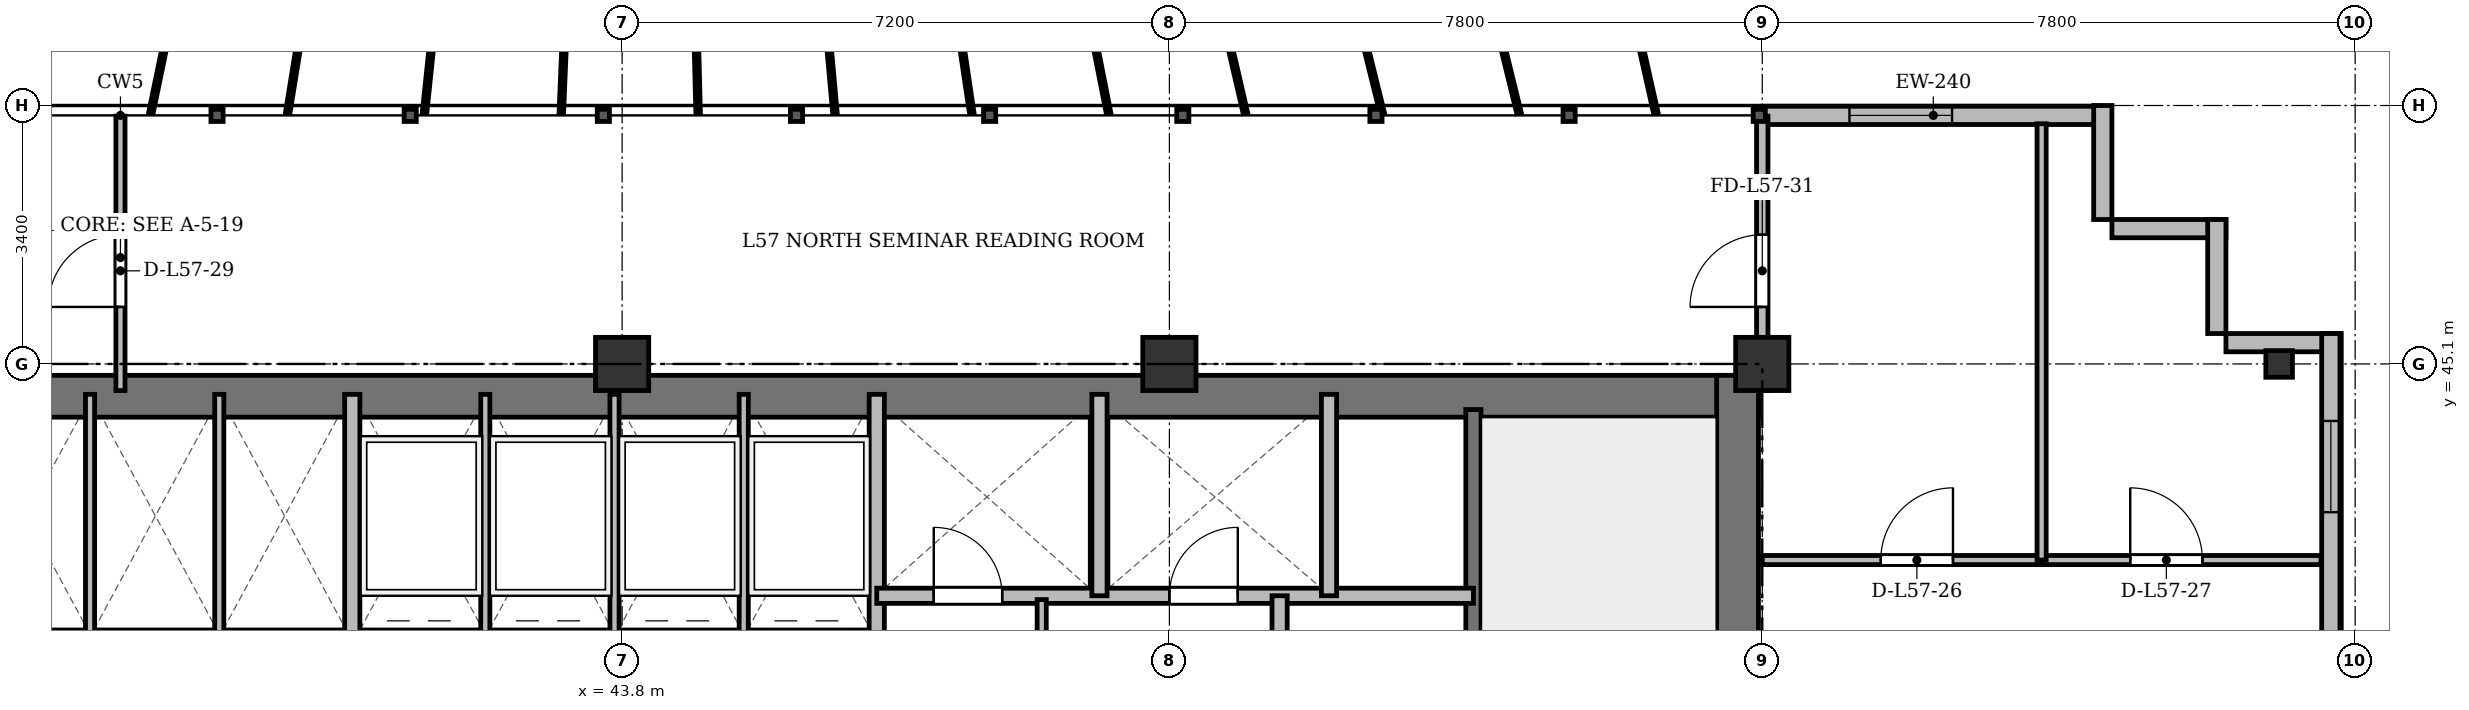
"""IFC4 building model, lengths in metres.
Left out: names, types, materials, properties, quantities, classifications, styles, units other than length and angle.
Written with IfcOpenShell. Run it as: python <this file> out.ifc"""

import sys

from ifc_helpers import new_model, si_unit, direction, frame, frame_2d, origin, origin_2d, place, context, subcontext, project, spatial, rectangle, i_section, extrude, source, transform, mapped, element, fill, save


model = new_model("IFC4")
c1 = context("Model", 3, precision=1e-05, world=origin(), true_north=direction((0.0, 1.0)))
c2 = subcontext(c1, "Body", "Model", "MODEL_VIEW")
j1 = project(units=[si_unit("LENGTHUNIT", "METRE"), si_unit("PLANEANGLEUNIT", "RADIAN")], contexts=[c1])
p1 = place(None, origin())
s1 = spatial("IfcSite", under=j1, at=p1, CompositionType="ELEMENT")
p2 = place(p1, origin())
s2 = spatial("IfcBuilding", under=s1, at=p2, CompositionType="ELEMENT")
p3 = place(p2, frame((0.0, 0.0, 219.3)))
s3 = spatial("IfcBuildingStorey", under=s2, at=p3, CompositionType="ELEMENT", Elevation=219.3)
m1 = source(origin(), c2, "Body", "SweptSolid", [
    extrude(rectangle(XDim=0.7, YDim=0.7, at=origin_2d()), origin(), (0.0, 0.0, 1.0), 3.6),
])
for number, where, z_axis, x_axis in (
    (1, (43.8, 45.1, 0.0), (0.0, 0.0, 1.0), (1.0, 0.0, 0.0)),
    (2, (51.0, 45.1, 0.0), (0.0, 0.0, 1.0), (1.0, 0.0, 0.0)),
    (3, (58.8, 45.1, 0.0), (0.0, 0.0, 1.0), (1.0, 0.0, 0.0)),
):
    element("IfcColumn", number, at=place(p3, frame(where, z_axis=z_axis, x_axis=x_axis)), inside=s3, PredefinedType="COLUMN", context=c2, shape_type="MappedRepresentation", body=[
        mapped(m1, transform((0.0, 0.0, 0.0), x_axis=(1.0, 0.0, 0.0), y_axis=(0.0, 1.0, 0.0), z_axis=(0.0, 0.0, 1.0), scale=1.0)),
    ])
m2 = source(origin(), c2, "Body", "SweptSolid", [
    extrude(i_section(OverallWidth=0.35, OverallDepth=0.35, WebThickness=0.018, FlangeThickness=0.028, at=origin_2d()), origin(), (0.0, 0.0, 1.0), 3.6),
])
p4 = place(p3, frame((65.6, 45.1, 0.0), z_axis=(0.0, 0.0, 1.0), x_axis=(1.0, 0.0, 0.0)))
e4 = element("IfcColumn", 4, at=p4, inside=s3, PredefinedType="COLUMN", context=c2, shape_type="MappedRepresentation", body=[
    mapped(m2, transform((0.0, 0.0, 0.0), x_axis=(1.0, 0.0, 0.0), y_axis=(0.0, 1.0, 0.0), z_axis=(0.0, 0.0, 1.0), scale=1.0)),
])
p5 = place(p3, frame((58.8, 48.37, 0.0), z_axis=(0.0, 0.0, 1.0), x_axis=(1.0, 0.0, 0.0)))
e5 = element("IfcWall", 5, at=p5, inside=s3, PredefinedType="SOLIDWALL", context=c2, shape_type="SweptSolid", body=[
    extrude(rectangle(XDim=4.5, YDim=0.24, at=frame_2d((2.25, 0.0))), origin(), (0.0, 0.0, 1.0), 3.36),
])
p6 = place(p5, frame((1.147, 0.0, 0.9)))
e6 = element("IfcOpeningElement", 6, at=p6, cuts=e5, PredefinedType="OPENING", context=c2, shape_type="SweptSolid", body=[
    extrude(rectangle(XDim=1.35, YDim=1.5, at=frame_2d((0.675, 0.75))), frame((0.0, 0.13, 0.0), z_axis=(0.0, -1.0, 0.0), x_axis=(1.0, 0.0, 0.0)), (0.0, 0.0, 1.0), 0.26),
])
for number, where, z_axis, x_axis in (
    (7, (63.28, 48.5, 0.0), (0.0, 0.0, 1.0), (0.0, -1.0, 0.0)),
    (8, (63.4, 46.88, 0.0), (0.0, 0.0, 1.0), (1.0, 0.0, 0.0)),
    (9, (64.78, 47.0, 0.0), (0.0, 0.0, 1.0), (0.0, -1.0, 0.0)),
    (10, (64.9, 45.38, 0.0), (0.0, 0.0, 1.0), (1.0, 0.0, 0.0)),
):
    element("IfcWall", number, at=place(p3, frame(where, z_axis=z_axis, x_axis=x_axis)), inside=s3, PredefinedType="SOLIDWALL", context=c2, shape_type="SweptSolid", body=[
        extrude(rectangle(XDim=1.5, YDim=0.24, at=frame_2d((0.75, 0.0))), origin(), (0.0, 0.0, 1.0), 3.36),
    ])
p7 = place(p3, frame((66.28, 45.5, 0.0), z_axis=(0.0, 0.0, 1.0), x_axis=(0.0, -1.0, 0.0)))
e11 = element("IfcWall", 11, at=p7, inside=s3, PredefinedType="SOLIDWALL", context=c2, shape_type="SweptSolid", body=[
    extrude(rectangle(XDim=39.1, YDim=0.24, at=frame_2d((19.55, 0.0))), origin(), (0.0, 0.0, 1.0), 3.36),
])
p8 = place(p7, frame((36.45, 0.0, 0.92)))
e12 = element("IfcOpeningElement", 12, at=p8, cuts=e11, PredefinedType="OPENING", context=c2, shape_type="SweptSolid", body=[
    extrude(rectangle(XDim=1.2, YDim=1.65, at=frame_2d((0.6, 0.825))), frame((0.0, 0.13, 0.0), z_axis=(0.0, -1.0, 0.0), x_axis=(1.0, 0.0, 0.0)), (0.0, 0.0, 1.0), 0.26),
])
p9 = place(p7, frame((32.9, 0.0, 0.92)))
e13 = element("IfcOpeningElement", 13, at=p9, cuts=e11, PredefinedType="OPENING", context=c2, shape_type="SweptSolid", body=[
    extrude(rectangle(XDim=2.4, YDim=2.1, at=frame_2d((1.2, 1.05))), frame((0.0, 0.13, 0.0), z_axis=(0.0, -1.0, 0.0), x_axis=(1.0, 0.0, 0.0)), (0.0, 0.0, 1.0), 0.26),
])
p10 = place(p7, frame((28.7, 0.0, 0.92)))
e14 = element("IfcOpeningElement", 14, at=p10, cuts=e11, PredefinedType="OPENING", context=c2, shape_type="SweptSolid", body=[
    extrude(rectangle(XDim=2.4, YDim=2.1, at=frame_2d((1.2, 1.05))), frame((0.0, 0.13, 0.0), z_axis=(0.0, -1.0, 0.0), x_axis=(1.0, 0.0, 0.0)), (0.0, 0.0, 1.0), 0.26),
])
p11 = place(p7, frame((21.5, 0.0, 0.92)))
e15 = element("IfcOpeningElement", 15, at=p11, cuts=e11, PredefinedType="OPENING", context=c2, shape_type="SweptSolid", body=[
    extrude(rectangle(XDim=2.4, YDim=2.1, at=frame_2d((1.2, 1.05))), frame((0.0, 0.13, 0.0), z_axis=(0.0, -1.0, 0.0), x_axis=(1.0, 0.0, 0.0)), (0.0, 0.0, 1.0), 0.26),
])
p12 = place(p7, frame((7.5, 0.0, 0.92)))
e16 = element("IfcOpeningElement", 16, at=p12, cuts=e11, PredefinedType="OPENING", context=c2, shape_type="SweptSolid", body=[
    extrude(rectangle(XDim=2.4, YDim=2.1, at=frame_2d((1.2, 1.05))), frame((0.0, 0.13, 0.0), z_axis=(0.0, -1.0, 0.0), x_axis=(1.0, 0.0, 0.0)), (0.0, 0.0, 1.0), 0.26),
])
p13 = place(p7, frame((4.5, 0.0, 0.92)))
e17 = element("IfcOpeningElement", 17, at=p13, cuts=e11, PredefinedType="OPENING", context=c2, shape_type="SweptSolid", body=[
    extrude(rectangle(XDim=1.2, YDim=1.65, at=frame_2d((0.6, 0.825))), frame((0.0, 0.13, 0.0), z_axis=(0.0, -1.0, 0.0), x_axis=(1.0, 0.0, 0.0)), (0.0, 0.0, 1.0), 0.26),
])
p14 = place(p7, frame((1.15, 0.0, 0.92)))
e18 = element("IfcOpeningElement", 18, at=p14, cuts=e11, PredefinedType="OPENING", context=c2, shape_type="SweptSolid", body=[
    extrude(rectangle(XDim=1.2, YDim=1.65, at=frame_2d((0.6, 0.825))), frame((0.0, 0.13, 0.0), z_axis=(0.0, -1.0, 0.0), x_axis=(1.0, 0.0, 0.0)), (0.0, 0.0, 1.0), 0.26),
])
p15 = place(p3, frame((15.65, 44.675, 0.0), z_axis=(0.0, 0.0, 1.0), x_axis=(1.0, 0.0, 0.0)))
e19 = element("IfcWall", 19, at=p15, inside=s3, PredefinedType="SHEAR", context=c2, shape_type="SweptSolid", body=[
    extrude(rectangle(XDim=43.1, YDim=0.55, at=frame_2d((21.55, 0.0))), origin(), (0.0, 0.0, 1.0), 3.36),
])
p16 = place(p3, frame((58.475, 33.4, 0.0), z_axis=(0.0, 0.0, 1.0), x_axis=(0.0, 1.0, 0.0)))
e20 = element("IfcWall", 20, at=p16, inside=s3, PredefinedType="SHEAR", context=c2, shape_type="SweptSolid", body=[
    extrude(rectangle(XDim=11.55, YDim=0.55, at=frame_2d((5.775, 0.0))), origin(), (0.0, 0.0, 1.0), 3.36),
])
p17 = place(p3, frame((55.0, 33.4, 0.0), z_axis=(0.0, 0.0, 1.0), x_axis=(0.0, 1.0, 0.0)))
e21 = element("IfcWall", 21, at=p17, inside=s3, PredefinedType="SHEAR", context=c2, shape_type="SweptSolid", body=[
    extrude(rectangle(XDim=11.1, YDim=0.2, at=frame_2d((5.55, 0.0))), origin(), (0.0, 0.0, 1.0), 3.36),
])
p18 = place(p17, frame((0.85, 0.0, 0.0)))
e22 = element("IfcOpeningElement", 22, at=p18, cuts=e21, PredefinedType="OPENING", context=c2, shape_type="SweptSolid", body=[
    extrude(rectangle(XDim=1.1, YDim=2.15, at=frame_2d((0.55, 1.075))), frame((0.0, 0.11, 0.0), z_axis=(0.0, -1.0, 0.0), x_axis=(1.0, 0.0, 0.0)), (0.0, 0.0, 1.0), 0.22),
])
for number, where, z_axis, x_axis in (
    (23, (36.8, 41.5, 0.0), (0.0, 0.0, 1.0), (0.0, 1.0, 0.0)),
    (24, (38.5, 41.5, 0.0), (0.0, 0.0, 1.0), (0.0, 1.0, 0.0)),
):
    element("IfcWall", number, at=place(p3, frame(where, z_axis=z_axis, x_axis=x_axis)), inside=s3, PredefinedType="PARTITIONING", context=c2, shape_type="SweptSolid", body=[
        extrude(rectangle(XDim=3.2, YDim=0.12, at=frame_2d((1.6, 0.0))), origin(), (0.0, 0.0, 1.0), 3.36),
    ])
p19 = place(p3, frame((40.25, 41.5, 0.0), z_axis=(0.0, 0.0, 1.0), x_axis=(0.0, 1.0, 0.0)))
e25 = element("IfcWall", 25, at=p19, inside=s3, PredefinedType="SOLIDWALL", context=c2, shape_type="SweptSolid", body=[
    extrude(rectangle(XDim=3.2, YDim=0.2, at=frame_2d((1.6, 0.0))), origin(), (0.0, 0.0, 1.0), 3.36),
])
for number, where, z_axis, x_axis in (
    (26, (42.0, 41.5, 0.0), (0.0, 0.0, 1.0), (0.0, 1.0, 0.0)),
    (27, (43.7, 41.5, 0.0), (0.0, 0.0, 1.0), (0.0, 1.0, 0.0)),
    (28, (45.4, 41.5, 0.0), (0.0, 0.0, 1.0), (0.0, 1.0, 0.0)),
):
    element("IfcWall", number, at=place(p3, frame(where, z_axis=z_axis, x_axis=x_axis)), inside=s3, PredefinedType="PARTITIONING", context=c2, shape_type="SweptSolid", body=[
        extrude(rectangle(XDim=3.2, YDim=0.12, at=frame_2d((1.6, 0.0))), origin(), (0.0, 0.0, 1.0), 3.36),
    ])
p20 = place(p3, frame((47.15, 33.4, 0.0), z_axis=(0.0, 0.0, 1.0), x_axis=(0.0, 1.0, 0.0)))
e29 = element("IfcWall", 29, at=p20, inside=s3, PredefinedType="SOLIDWALL", context=c2, shape_type="SweptSolid", body=[
    extrude(rectangle(XDim=11.3, YDim=0.2, at=frame_2d((5.65, 0.0))), origin(), (0.0, 0.0, 1.0), 2.91),
])
p21 = place(p3, frame((47.15, 42.05, 0.0), z_axis=(0.0, 0.0, 1.0), x_axis=(1.0, 0.0, 0.0)))
e30 = element("IfcWall", 30, at=p21, inside=s3, PredefinedType="SOLIDWALL", context=c2, shape_type="SweptSolid", body=[
    extrude(rectangle(XDim=7.85, YDim=0.2, at=frame_2d((3.925, 0.0))), origin(), (0.0, 0.0, 1.0), 2.86),
])
p22 = place(p21, frame((0.75, 0.0, 0.0)))
e31 = element("IfcOpeningElement", 31, at=p22, cuts=e30, PredefinedType="OPENING", context=c2, shape_type="SweptSolid", body=[
    extrude(rectangle(XDim=0.9, YDim=2.1, at=frame_2d((0.45, 1.05))), frame((0.0, 0.11, 0.0), z_axis=(0.0, -1.0, 0.0), x_axis=(1.0, 0.0, 0.0)), (0.0, 0.0, 1.0), 0.22),
])
p23 = place(p21, frame((3.85, 0.0, 0.0)))
e32 = element("IfcOpeningElement", 32, at=p23, cuts=e30, PredefinedType="OPENING", context=c2, shape_type="SweptSolid", body=[
    extrude(rectangle(XDim=0.9, YDim=2.1, at=frame_2d((0.45, 1.05))), frame((0.0, 0.11, 0.0), z_axis=(0.0, -1.0, 0.0), x_axis=(1.0, 0.0, 0.0)), (0.0, 0.0, 1.0), 0.22),
])
for number, where, z_axis, x_axis in (
    (33, (50.08, 42.05, 0.0), (0.0, 0.0, 1.0), (0.0, 1.0, 0.0)),
    (34, (53.1, 42.05, 0.0), (0.0, 0.0, 1.0), (0.0, 1.0, 0.0)),
):
    element("IfcWall", number, at=place(p3, frame(where, z_axis=z_axis, x_axis=x_axis)), inside=s3, PredefinedType="SOLIDWALL", context=c2, shape_type="SweptSolid", body=[
        extrude(rectangle(XDim=2.65, YDim=0.2, at=frame_2d((1.325, 0.0))), origin(), (0.0, 0.0, 1.0), 3.36),
    ])
p24 = place(p3, frame((52.45, 33.4, 0.0), z_axis=(0.0, 0.0, 1.0), x_axis=(0.0, 1.0, 0.0)))
e35 = element("IfcWall", 35, at=p24, inside=s3, PredefinedType="PARTITIONING", context=c2, shape_type="SweptSolid", body=[
    extrude(rectangle(XDim=8.65, YDim=0.2, at=frame_2d((4.325, 0.0))), origin(), (0.0, 0.0, 1.0), 2.91),
])
p25 = place(p24, frame((6.2, 0.0, 0.0)))
e36 = element("IfcOpeningElement", 36, at=p25, cuts=e35, PredefinedType="OPENING", context=c2, shape_type="SweptSolid", body=[
    extrude(rectangle(XDim=0.95, YDim=2.15, at=frame_2d((0.475, 1.075))), frame((0.0, 0.11, 0.0), z_axis=(0.0, -1.0, 0.0), x_axis=(1.0, 0.0, 0.0)), (0.0, 0.0, 1.0), 0.22),
])
p26 = place(p3, frame((49.32, 33.4, 0.0), z_axis=(0.0, 0.0, 1.0), x_axis=(0.0, 1.0, 0.0)))
e37 = element("IfcWall", 37, at=p26, inside=s3, PredefinedType="PARTITIONING", context=c2, shape_type="SweptSolid", body=[
    extrude(rectangle(XDim=8.6, YDim=0.12, at=frame_2d((4.3, 0.0))), origin(), (0.0, 0.0, 1.0), 2.91),
])
p27 = place(p26, frame((0.85, 0.0, 0.0)))
e38 = element("IfcOpeningElement", 38, at=p27, cuts=e37, PredefinedType="OPENING", context=c2, shape_type="SweptSolid", body=[
    extrude(rectangle(XDim=0.95, YDim=2.15, at=frame_2d((0.475, 1.075))), frame((0.0, 0.07, 0.0), z_axis=(0.0, -1.0, 0.0), x_axis=(1.0, 0.0, 0.0)), (0.0, 0.0, 1.0), 0.14),
])
p28 = place(p26, frame((3.55, 0.0, 0.0)))
e39 = element("IfcOpeningElement", 39, at=p28, cuts=e37, PredefinedType="OPENING", context=c2, shape_type="SweptSolid", body=[
    extrude(rectangle(XDim=0.95, YDim=2.15, at=frame_2d((0.475, 1.075))), frame((0.0, 0.07, 0.0), z_axis=(0.0, -1.0, 0.0), x_axis=(1.0, 0.0, 0.0)), (0.0, 0.0, 1.0), 0.14),
])
p29 = place(p26, frame((6.3, 0.0, 0.0)))
e40 = element("IfcOpeningElement", 40, at=p29, cuts=e37, PredefinedType="OPENING", context=c2, shape_type="SweptSolid", body=[
    extrude(rectangle(XDim=0.95, YDim=2.15, at=frame_2d((0.475, 1.075))), frame((0.0, 0.07, 0.0), z_axis=(0.0, -1.0, 0.0), x_axis=(1.0, 0.0, 0.0)), (0.0, 0.0, 1.0), 0.14),
])
p30 = place(p3, frame((58.8, 42.52, 0.0), z_axis=(0.0, 0.0, 1.0), x_axis=(1.0, 0.0, 0.0)))
e41 = element("IfcWall", 41, at=p30, inside=s3, PredefinedType="PARTITIONING", context=c2, shape_type="SweptSolid", body=[
    extrude(rectangle(XDim=3.675, YDim=0.12, at=frame_2d((1.837, 0.0))), origin(), (0.0, 0.0, 1.0), 2.86),
])
p31 = place(p30, frame((1.559, 0.0, 0.0)))
e42 = element("IfcOpeningElement", 42, at=p31, cuts=e41, PredefinedType="OPENING", context=c2, shape_type="SweptSolid", body=[
    extrude(rectangle(XDim=0.95, YDim=2.15, at=frame_2d((0.475, 1.075))), frame((0.0, 0.07, 0.0), z_axis=(0.0, -1.0, 0.0), x_axis=(1.0, 0.0, 0.0)), (0.0, 0.0, 1.0), 0.14),
])
p32 = place(p3, frame((62.475, 42.52, 0.0), z_axis=(0.0, 0.0, 1.0), x_axis=(1.0, 0.0, 0.0)))
e43 = element("IfcWall", 43, at=p32, inside=s3, PredefinedType="PARTITIONING", context=c2, shape_type="SweptSolid", body=[
    extrude(rectangle(XDim=3.675, YDim=0.12, at=frame_2d((1.837, 0.0))), origin(), (0.0, 0.0, 1.0), 2.86),
])
p33 = place(p32, frame((1.166, 0.0, 0.0)))
e44 = element("IfcOpeningElement", 44, at=p33, cuts=e43, PredefinedType="OPENING", context=c2, shape_type="SweptSolid", body=[
    extrude(rectangle(XDim=0.95, YDim=2.15, at=frame_2d((0.475, 1.075))), frame((0.0, 0.07, 0.0), z_axis=(0.0, -1.0, 0.0), x_axis=(1.0, 0.0, 0.0)), (0.0, 0.0, 1.0), 0.14),
])
p34 = place(p3, frame((62.475, 42.52, 0.0), z_axis=(0.0, 0.0, 1.0), x_axis=(0.0, 1.0, 0.0)))
e45 = element("IfcWall", 45, at=p34, inside=s3, PredefinedType="PARTITIONING", context=c2, shape_type="SweptSolid", body=[
    extrude(rectangle(XDim=5.74, YDim=0.12, at=frame_2d((2.87, 0.0))), origin(), (0.0, 0.0, 1.0), 2.91),
])
p35 = place(p3, frame((37.2, 44.75, 0.0), z_axis=(0.0, 0.0, 1.0), x_axis=(0.0, 1.0, 0.0)))
e46 = element("IfcWall", 46, at=p35, inside=s3, PredefinedType="PARTITIONING", context=c2, shape_type="SweptSolid", body=[
    extrude(rectangle(XDim=3.61, YDim=0.12, at=frame_2d((1.805, 0.0))), origin(), (0.0, 0.0, 1.0), 2.91),
])
p36 = place(p35, frame((1.1, 0.0, 0.0)))
e47 = element("IfcOpeningElement", 47, at=p36, cuts=e46, PredefinedType="OPENING", context=c2, shape_type="SweptSolid", body=[
    extrude(rectangle(XDim=0.95, YDim=2.15, at=frame_2d((0.475, 1.075))), frame((0.0, 0.07, 0.0), z_axis=(0.0, -1.0, 0.0), x_axis=(1.0, 0.0, 0.0)), (0.0, 0.0, 1.0), 0.14),
])
p37 = place(p3, frame((58.8, 44.75, 0.0), z_axis=(0.0, 0.0, 1.0), x_axis=(0.0, 1.0, 0.0)))
e48 = element("IfcWall", 48, at=p37, inside=s3, PredefinedType="PARTITIONING", context=c2, shape_type="SweptSolid", body=[
    extrude(rectangle(XDim=3.61, YDim=0.15, at=frame_2d((1.805, 0.0))), origin(), (0.0, 0.0, 1.0), 2.86),
])
p38 = place(p37, frame((1.1, 0.0, 0.0)))
e49 = element("IfcOpeningElement", 49, at=p38, cuts=e48, PredefinedType="OPENING", context=c2, shape_type="SweptSolid", body=[
    extrude(rectangle(XDim=0.95, YDim=2.15, at=frame_2d((0.475, 1.075))), frame((0.0, 0.085, 0.0), z_axis=(0.0, -1.0, 0.0), x_axis=(1.0, 0.0, 0.0)), (0.0, 0.0, 1.0), 0.17),
])
m3 = source(origin(), c2, "Body", "SweptSolid", [
    extrude(rectangle(XDim=1.35, YDim=1.5, at=frame_2d((0.675, 0.75))), frame((0.0, 0.03, 0.0), z_axis=(0.0, -1.0, 0.0), x_axis=(1.0, 0.0, 0.0)), (0.0, 0.0, 1.0), 0.06),
])
p39 = place(p6, origin())
e50 = element("IfcWindow", 50, at=p39, inside=s3, PartitioningType="SINGLE_PANEL", PredefinedType="WINDOW", context=c2, shape_type="MappedRepresentation", body=[
    mapped(m3, transform((0.0, 0.0, 0.0), x_axis=(1.0, 0.0, 0.0), y_axis=(0.0, 1.0, 0.0), z_axis=(0.0, 0.0, 1.0), scale=1.0)),
])
fill(e6, e50)
m4 = source(origin(), c2, "Body", "SweptSolid", [
    extrude(rectangle(XDim=1.2, YDim=1.65, at=frame_2d((0.6, 0.825))), frame((0.0, 0.03, 0.0), z_axis=(0.0, -1.0, 0.0), x_axis=(1.0, 0.0, 0.0)), (0.0, 0.0, 1.0), 0.06),
])
p40 = place(p14, origin())
e51 = element("IfcWindow", 51, at=p40, inside=s3, PartitioningType="SINGLE_PANEL", PredefinedType="WINDOW", context=c2, shape_type="MappedRepresentation", body=[
    mapped(m4, transform((0.0, 0.0, 0.0), x_axis=(1.0, 0.0, 0.0), y_axis=(0.0, 1.0, 0.0), z_axis=(0.0, 0.0, 1.0), scale=1.0)),
])
fill(e18, e51)
m5 = source(origin(), c2, "Body", "SweptSolid", [
    extrude(rectangle(XDim=0.9, YDim=2.1, at=frame_2d((0.45, 1.05))), frame((0.0, 0.025, 0.0), z_axis=(0.0, -1.0, 0.0), x_axis=(1.0, 0.0, 0.0)), (0.0, 0.0, 1.0), 0.05),
])
p41 = place(p22, origin())
e52 = element("IfcDoor", 52, at=p41, inside=s3, OperationType="SINGLE_SWING_LEFT", PredefinedType="DOOR", context=c2, shape_type="MappedRepresentation", body=[
    mapped(m5, transform((0.0, 0.0, 0.0), x_axis=(1.0, 0.0, 0.0), y_axis=(0.0, 1.0, 0.0), z_axis=(0.0, 0.0, 1.0), scale=1.0)),
])
fill(e31, e52)
p42 = place(p23, origin())
e53 = element("IfcDoor", 53, at=p42, inside=s3, OperationType="SINGLE_SWING_RIGHT", PredefinedType="DOOR", context=c2, shape_type="MappedRepresentation", body=[
    mapped(m5, transform((0.0, 0.0, 0.0), x_axis=(1.0, 0.0, 0.0), y_axis=(0.0, 1.0, 0.0), z_axis=(0.0, 0.0, 1.0), scale=1.0)),
])
fill(e32, e53)
m6 = source(origin(), c2, "Body", "SweptSolid", [
    extrude(rectangle(XDim=0.95, YDim=2.15, at=frame_2d((0.475, 1.075))), frame((0.0, 0.025, 0.0), z_axis=(0.0, -1.0, 0.0), x_axis=(1.0, 0.0, 0.0)), (0.0, 0.0, 1.0), 0.05),
])
p43 = place(p31, origin())
e54 = element("IfcDoor", 54, at=p43, inside=s3, OperationType="SINGLE_SWING_RIGHT", PredefinedType="DOOR", context=c2, shape_type="MappedRepresentation", body=[
    mapped(m6, transform((0.0, 0.0, 0.0), x_axis=(1.0, 0.0, 0.0), y_axis=(0.0, 1.0, 0.0), z_axis=(0.0, 0.0, 1.0), scale=1.0)),
])
fill(e42, e54)
p44 = place(p33, origin())
e55 = element("IfcDoor", 55, at=p44, inside=s3, OperationType="SINGLE_SWING_LEFT", PredefinedType="DOOR", context=c2, shape_type="MappedRepresentation", body=[
    mapped(m6, transform((0.0, 0.0, 0.0), x_axis=(1.0, 0.0, 0.0), y_axis=(0.0, 1.0, 0.0), z_axis=(0.0, 0.0, 1.0), scale=1.0)),
])
fill(e44, e55)
p45 = place(p36, origin())
e56 = element("IfcDoor", 56, at=p45, inside=s3, OperationType="SINGLE_SWING_LEFT", PredefinedType="DOOR", context=c2, shape_type="MappedRepresentation", body=[
    mapped(m6, transform((0.0, 0.0, 0.0), x_axis=(1.0, 0.0, 0.0), y_axis=(0.0, 1.0, 0.0), z_axis=(0.0, 0.0, 1.0), scale=1.0)),
])
fill(e47, e56)
p46 = place(p38, origin())
e57 = element("IfcDoor", 57, at=p46, inside=s3, OperationType="SINGLE_SWING_LEFT", PredefinedType="DOOR", context=c2, shape_type="MappedRepresentation", body=[
    mapped(m6, transform((0.0, 0.0, 0.0), x_axis=(1.0, 0.0, 0.0), y_axis=(0.0, 1.0, 0.0), z_axis=(0.0, 0.0, 1.0), scale=1.0)),
])
fill(e49, e57)
save(model, sys.argv[1])
